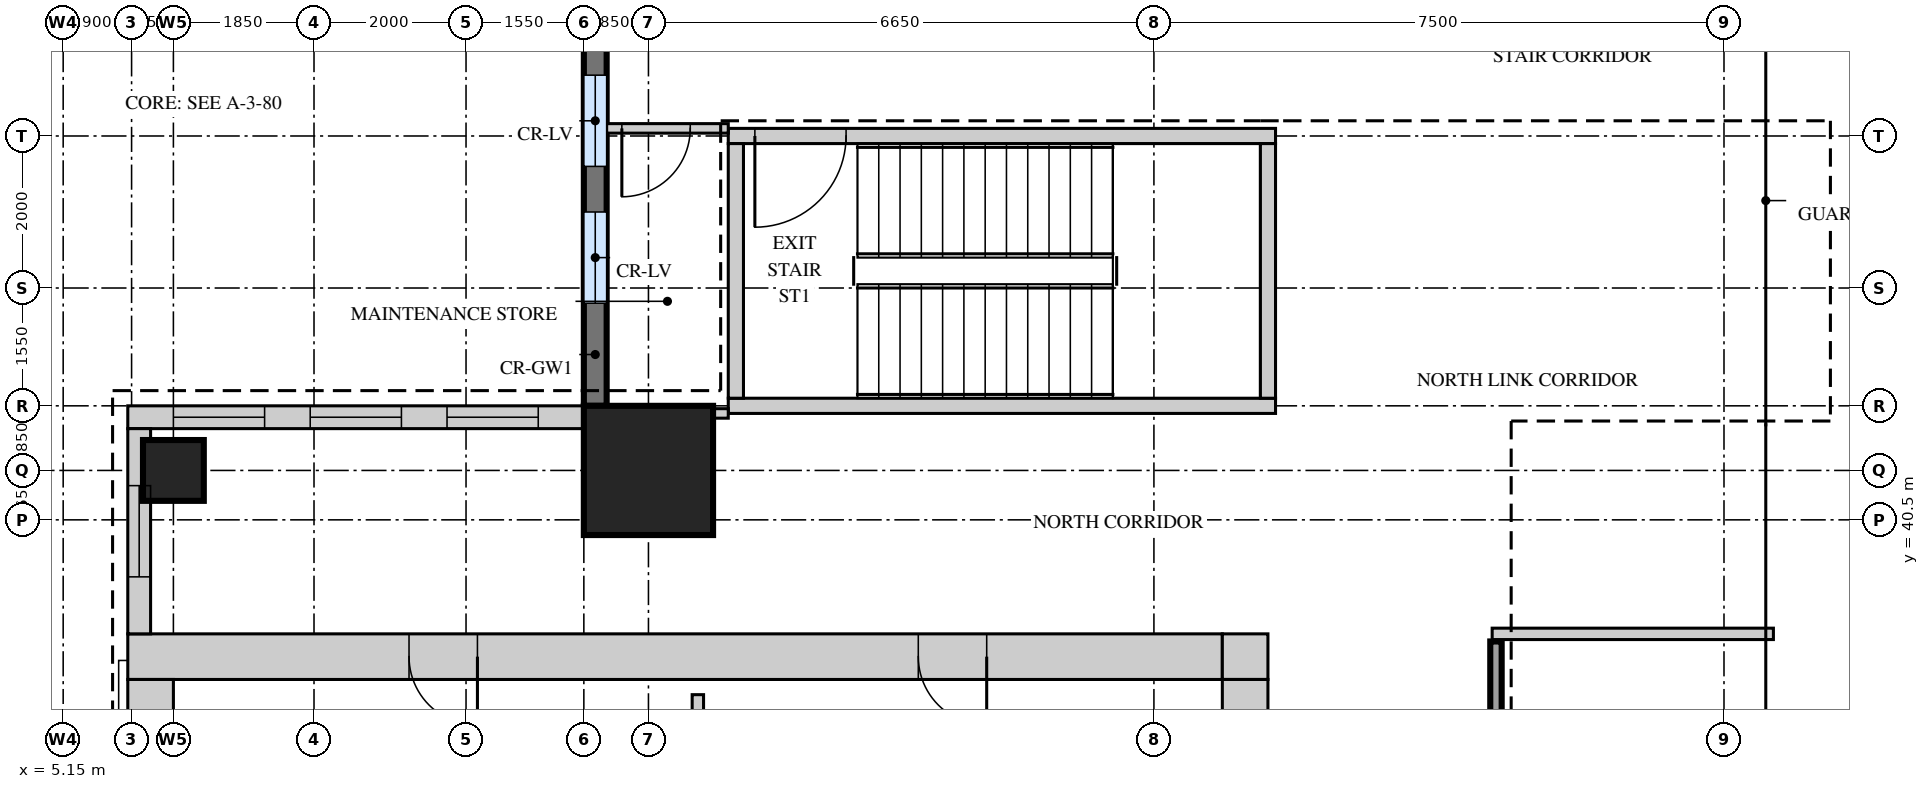
"""IFC4 building model, lengths in metres.
Left out: names, types, materials, properties, quantities, classifications, styles, units other than length and angle.
Written with IfcOpenShell. Run it as: python <this file> out.ifc"""

import sys

from ifc_helpers import new_model, si_unit, direction, frame, frame_2d, origin, origin_2d, place, context, subcontext, project, spatial, rectangle, extrude, source, transform, mapped, element, fill, save


model = new_model("IFC4")
c1 = context("Model", 3, precision=1e-05, world=origin(), true_north=direction((0.0, 1.0)))
c2 = subcontext(c1, "Body", "Model", "MODEL_VIEW")
j1 = project(units=[si_unit("LENGTHUNIT", "METRE"), si_unit("PLANEANGLEUNIT", "RADIAN")], contexts=[c1])
p1 = place(None, origin())
s1 = spatial("IfcSite", under=j1, at=p1, CompositionType="ELEMENT")
p2 = place(p1, origin())
s2 = spatial("IfcBuilding", under=s1, at=p2, CompositionType="ELEMENT")
p3 = place(p2, frame((0.0, 0.0, 348.2)))
s3 = spatial("IfcBuildingStorey", under=s2, at=p3, CompositionType="ELEMENT", Elevation=348.2)
m1 = source(origin(), c2, "Body", "SweptSolid", [
    extrude(rectangle(XDim=14.4, YDim=0.6, at=frame_2d((7.2, 0.0))), origin(), (0.0, 0.0, 1.0), 4.25),
])
p4 = place(p3, frame((6.0, 38.7, 0.0), z_axis=(0.0, 0.0, 1.0), x_axis=(1.0, 0.0, 0.0)))
e1 = element("IfcWall", 1, at=p4, inside=s3, PredefinedType="SHEAR", context=c2, shape_type="MappedRepresentation", body=[
    mapped(m1, transform((0.0, 0.0, 0.0))),
])
m2 = source(origin(), c2, "Body", "SweptSolid", [
    extrude(rectangle(XDim=0.9, YDim=2.1, at=frame_2d((0.45, 1.05))), frame((0.0, 0.31, 0.0), z_axis=(0.0, -1.0, 0.0), x_axis=(1.0, 0.0, 0.0)), (0.0, 0.0, 1.0), 0.62),
])
p5 = place(p4, frame((3.7, 0.0, 0.0)))
e2 = element("IfcOpeningElement", 2, at=p5, cuts=e1, PredefinedType="OPENING", context=c2, shape_type="MappedRepresentation", body=[
    mapped(m2, transform((0.0, 0.0, 0.0))),
])
p6 = place(p4, frame((10.4, 0.0, 0.0)))
e3 = element("IfcOpeningElement", 3, at=p6, cuts=e1, PredefinedType="OPENING", context=c2, shape_type="MappedRepresentation", body=[
    mapped(m2, transform((0.0, 0.0, 0.0))),
])
m3 = source(origin(), c2, "Body", "SweptSolid", [
    extrude(rectangle(XDim=0.6, YDim=0.6, at=frame_2d((0.3, 0.0))), origin(), (0.0, 0.0, 1.0), 4.25),
])
p7 = place(p3, frame((20.4, 38.7, 0.0), z_axis=(0.0, 0.0, 1.0), x_axis=(1.0, 0.0, 0.0)))
e4 = element("IfcWall", 4, at=p7, inside=s3, PredefinedType="SHEAR", context=c2, shape_type="MappedRepresentation", body=[
    mapped(m3, transform((0.0, 0.0, 0.0))),
])
m4 = source(origin(), c2, "Body", "SweptSolid", [
    extrude(rectangle(XDim=22.8, YDim=0.6, at=frame_2d((11.4, 0.0))), origin(), (0.0, 0.0, 1.0), 4.25),
])
p8 = place(p3, frame((20.7, 15.6, 0.0), z_axis=(0.0, 0.0, 1.0), x_axis=(0.0, 1.0, 0.0)))
e5 = element("IfcWall", 5, at=p8, inside=s3, PredefinedType="SHEAR", context=c2, shape_type="MappedRepresentation", body=[
    mapped(m4, transform((0.0, 0.0, 0.0))),
])
p9 = place(p8, frame((8.2, 0.0, 0.0)))
e6 = element("IfcOpeningElement", 6, at=p9, cuts=e5, PredefinedType="OPENING", context=c2, shape_type="MappedRepresentation", body=[
    mapped(m2, transform((0.0, 0.0, 0.0))),
])
p10 = place(p8, frame((11.35, 0.0, 0.0)))
e7 = element("IfcOpeningElement", 7, at=p10, cuts=e5, PredefinedType="OPENING", context=c2, shape_type="MappedRepresentation", body=[
    mapped(m2, transform((0.0, 0.0, 0.0))),
])
p11 = place(p8, frame((14.65, 0.0, 0.0)))
e8 = element("IfcOpeningElement", 8, at=p11, cuts=e5, PredefinedType="OPENING", context=c2, shape_type="MappedRepresentation", body=[
    mapped(m2, transform((0.0, 0.0, 0.0))),
])
p12 = place(p8, frame((1.55, 0.0, 0.0)))
e9 = element("IfcOpeningElement", 9, at=p12, cuts=e5, PredefinedType="OPENING", context=c2, shape_type="MappedRepresentation", body=[
    mapped(m2, transform((0.0, 0.0, 0.0))),
])
p13 = place(p8, frame((5.1, 0.0, 0.0)))
e10 = element("IfcOpeningElement", 10, at=p13, cuts=e5, PredefinedType="OPENING", context=c2, shape_type="MappedRepresentation", body=[
    mapped(m2, transform((0.0, 0.0, 0.0))),
])
p14 = place(p3, frame((6.3, 15.6, 0.0), z_axis=(0.0, 0.0, 1.0), x_axis=(0.0, 1.0, 0.0)))
e11 = element("IfcWall", 11, at=p14, inside=s3, PredefinedType="SHEAR", context=c2, shape_type="MappedRepresentation", body=[
    mapped(m4, transform((0.0, 0.0, 0.0))),
])
m5 = source(origin(), c2, "Body", "SweptSolid", [
    extrude(rectangle(XDim=7.2, YDim=0.2, at=frame_2d((3.6, 0.0))), origin(), (0.0, 0.0, 1.0), 4.25),
])
p15 = place(p3, frame((13.9, 45.55, 0.0), z_axis=(0.0, 0.0, 1.0), x_axis=(1.0, 0.0, 0.0)))
e12 = element("IfcWall", 12, at=p15, inside=s3, PredefinedType="SHEAR", context=c2, shape_type="MappedRepresentation", body=[
    mapped(m5, transform((0.0, 0.0, 0.0))),
])
m6 = source(origin(), c2, "Body", "SweptSolid", [
    extrude(rectangle(XDim=1.2, YDim=2.1, at=frame_2d((0.6, 1.05))), frame((0.0, 0.11, 0.0), z_axis=(0.0, -1.0, 0.0), x_axis=(1.0, 0.0, 0.0)), (0.0, 0.0, 1.0), 0.22),
])
p16 = place(p15, frame((0.35, 0.0, 0.0)))
e13 = element("IfcOpeningElement", 13, at=p16, cuts=e12, PredefinedType="OPENING", context=c2, shape_type="MappedRepresentation", body=[
    mapped(m6, transform((0.0, 0.0, 0.0))),
])
p17 = place(p3, frame((13.9, 42.0, 0.0), z_axis=(0.0, 0.0, 1.0), x_axis=(1.0, 0.0, 0.0)))
e14 = element("IfcWall", 14, at=p17, inside=s3, PredefinedType="SHEAR", context=c2, shape_type="MappedRepresentation", body=[
    mapped(m5, transform((0.0, 0.0, 0.0))),
])
m7 = source(origin(), c2, "Body", "SweptSolid", [
    extrude(rectangle(XDim=3.35, YDim=0.2, at=frame_2d((1.675, 0.0))), origin(), (0.0, 0.0, 1.0), 4.25),
])
for number, where, z_axis, x_axis in (
    (15, (21.0, 42.1, 0.0), (0.0, 0.0, 1.0), (0.0, 1.0, 0.0)),
    (16, (14.0, 42.1, 0.0), (0.0, 0.0, 1.0), (0.0, 1.0, 0.0)),
):
    element("IfcWall", number, at=place(p3, frame(where, z_axis=z_axis, x_axis=x_axis)), inside=s3, PredefinedType="SHEAR", context=c2, shape_type="MappedRepresentation", body=[
        mapped(m7, transform((0.0, 0.0, 0.0))),
    ])
m8 = source(origin(), c2, "Body", "SweptSolid", [
    extrude(rectangle(XDim=1.7, YDim=1.7, at=origin_2d()), origin(), (0.0, 0.0, 1.0), 4.5),
])
p18 = place(p3, frame((12.85, 41.15, 0.0), z_axis=(0.0, 0.0, 1.0), x_axis=(1.0, 0.0, 0.0)))
e17 = element("IfcColumn", 17, at=p18, inside=s3, PredefinedType="COLUMN", context=c2, shape_type="MappedRepresentation", body=[
    mapped(m8, transform((0.0, 0.0, 0.0))),
])
m9 = source(origin(), c2, "Body", "SweptSolid", [
    extrude(rectangle(XDim=0.8, YDim=0.8, at=origin_2d()), origin(), (0.0, 0.0, 1.0), 4.5),
])
p19 = place(p3, frame((6.6, 41.15, 0.0), z_axis=(0.0, 0.0, 1.0), x_axis=(1.0, 0.0, 0.0)))
e18 = element("IfcColumn", 18, at=p19, inside=s3, PredefinedType="COLUMN", context=c2, shape_type="MappedRepresentation", body=[
    mapped(m9, transform((0.0, 0.0, 0.0))),
])
m10 = source(origin(), c2, "Body", "SweptSolid", [
    extrude(rectangle(XDim=5.7, YDim=0.3, at=frame_2d((2.85, 0.0))), origin(), (0.0, 0.0, 1.0), 4.5),
])
p20 = place(p3, frame((12.15, 47.7, 0.0), z_axis=(0.0, 0.0, 1.0), x_axis=(0.0, -1.0, 0.0)))
e19 = element("IfcWall", 19, at=p20, inside=s3, PredefinedType="SOLIDWALL", context=c2, shape_type="MappedRepresentation", body=[
    mapped(m10, transform((0.0, 0.0, 0.0))),
])
m11 = source(origin(), c2, "Body", "SweptSolid", [
    extrude(rectangle(XDim=1.2, YDim=2.4, at=frame_2d((0.6, 1.2))), frame((0.0, 0.16, 0.0), z_axis=(0.0, -1.0, 0.0), x_axis=(1.0, 0.0, 0.0)), (0.0, 0.0, 1.0), 0.32),
])
p21 = place(p20, frame((1.35, 0.0, 0.9)))
e20 = element("IfcOpeningElement", 20, at=p21, cuts=e19, PredefinedType="OPENING", context=c2, shape_type="MappedRepresentation", body=[
    mapped(m11, transform((0.0, 0.0, 0.0))),
])
p22 = place(p20, frame((3.15, 0.0, 0.9)))
e21 = element("IfcOpeningElement", 21, at=p22, cuts=e19, PredefinedType="OPENING", context=c2, shape_type="MappedRepresentation", body=[
    mapped(m11, transform((0.0, 0.0, 0.0))),
])
m12 = source(origin(), c2, "Body", "SweptSolid", [
    extrude(rectangle(XDim=6.0, YDim=0.3, at=frame_2d((3.0, 0.0))), origin(), (0.0, 0.0, 1.0), 4.5),
])
p23 = place(p3, frame((12.0, 41.85, 0.0), z_axis=(0.0, 0.0, 1.0), x_axis=(-1.0, 0.0, 0.0)))
e22 = element("IfcWall", 22, at=p23, inside=s3, PredefinedType="SOLIDWALL", context=c2, shape_type="MappedRepresentation", body=[
    mapped(m12, transform((0.0, 0.0, 0.0))),
])
p24 = place(p23, frame((0.6, 0.0, 0.9)))
e23 = element("IfcOpeningElement", 23, at=p24, cuts=e22, PredefinedType="OPENING", context=c2, shape_type="MappedRepresentation", body=[
    mapped(m11, transform((0.0, 0.0, 0.0))),
])
p25 = place(p23, frame((2.4, 0.0, 0.9)))
e24 = element("IfcOpeningElement", 24, at=p25, cuts=e22, PredefinedType="OPENING", context=c2, shape_type="MappedRepresentation", body=[
    mapped(m11, transform((0.0, 0.0, 0.0))),
])
p26 = place(p23, frame((4.2, 0.0, 0.9)))
e25 = element("IfcOpeningElement", 25, at=p26, cuts=e22, PredefinedType="OPENING", context=c2, shape_type="MappedRepresentation", body=[
    mapped(m11, transform((0.0, 0.0, 0.0))),
])
m13 = source(origin(), c2, "Body", "SweptSolid", [
    extrude(rectangle(XDim=2.7, YDim=0.3, at=frame_2d((1.35, 0.0))), origin(), (0.0, 0.0, 1.0), 4.5),
])
p27 = place(p3, frame((6.15, 41.7, 0.0), z_axis=(0.0, 0.0, 1.0), x_axis=(0.0, -1.0, 0.0)))
e26 = element("IfcWall", 26, at=p27, inside=s3, PredefinedType="SOLIDWALL", context=c2, shape_type="MappedRepresentation", body=[
    mapped(m13, transform((0.0, 0.0, 0.0))),
])
p28 = place(p27, frame((0.75, 0.0, 0.9)))
e27 = element("IfcOpeningElement", 27, at=p28, cuts=e26, PredefinedType="OPENING", context=c2, shape_type="MappedRepresentation", body=[
    mapped(m11, transform((0.0, 0.0, 0.0))),
])
m14 = source(origin(), c2, "Body", "SweptSolid", [
    extrude(rectangle(XDim=32.6, YDim=0.15, at=frame_2d((16.3, 0.0))), origin(), (0.0, 0.0, 1.0), 4.3),
])
p29 = place(p3, frame((24.0, 6.3, 0.0), z_axis=(0.0, 0.0, 1.0), x_axis=(0.0, 1.0, 0.0)))
e28 = element("IfcWall", 28, at=p29, inside=s3, PredefinedType="PARTITIONING", context=c2, shape_type="MappedRepresentation", body=[
    mapped(m14, transform((0.0, 0.0, 0.0))),
])
m15 = source(origin(), c2, "Body", "SweptSolid", [
    extrude(rectangle(XDim=0.9, YDim=2.1, at=frame_2d((0.45, 1.05))), frame((0.0, 0.085, 0.0), z_axis=(0.0, -1.0, 0.0), x_axis=(1.0, 0.0, 0.0)), (0.0, 0.0, 1.0), 0.17),
])
p30 = place(p29, frame((13.6, 0.0, 0.0)))
e29 = element("IfcOpeningElement", 29, at=p30, cuts=e28, PredefinedType="OPENING", context=c2, shape_type="MappedRepresentation", body=[
    mapped(m15, transform((0.0, 0.0, 0.0))),
])
p31 = place(p29, frame((25.9, 0.0, 0.0)))
e30 = element("IfcOpeningElement", 30, at=p31, cuts=e28, PredefinedType="OPENING", context=c2, shape_type="MappedRepresentation", body=[
    mapped(m15, transform((0.0, 0.0, 0.0))),
])
m16 = source(origin(), c2, "Body", "SweptSolid", [
    extrude(rectangle(XDim=5.9, YDim=0.15, at=frame_2d((2.95, 0.0))), origin(), (0.0, 0.0, 1.0), 4.3),
])
p32 = place(p3, frame((13.5, 32.3, 0.0), z_axis=(0.0, 0.0, 1.0), x_axis=(0.0, 1.0, 0.0)))
e31 = element("IfcWall", 31, at=p32, inside=s3, PredefinedType="PARTITIONING", context=c2, shape_type="MappedRepresentation", body=[
    mapped(m16, transform((0.0, 0.0, 0.0))),
])
m17 = source(origin(), c2, "Body", "SweptSolid", [
    extrude(rectangle(XDim=3.7, YDim=0.15, at=frame_2d((1.85, 0.0))), origin(), (0.0, 0.0, 1.0), 4.3),
])
p33 = place(p3, frame((23.95, 39.0, 0.0), z_axis=(0.0, 0.0, 1.0), x_axis=(1.0, 0.0, 0.0)))
e32 = element("IfcWall", 32, at=p33, inside=s3, PredefinedType="PARTITIONING", context=c2, shape_type="MappedRepresentation", body=[
    mapped(m17, transform((0.0, 0.0, 0.0))),
])
m18 = source(origin(), c2, "Body", "SweptSolid", [
    extrude(rectangle(XDim=1.9, YDim=0.125, at=frame_2d((0.95, 0.0))), origin(), (0.0, 0.0, 1.0), 4.3),
])
p34 = place(p3, frame((12.0, 41.9, 0.0), z_axis=(0.0, 0.0, 1.0), x_axis=(1.0, 0.0, 0.0)))
e33 = element("IfcWall", 33, at=p34, inside=s3, PredefinedType="PARTITIONING", context=c2, shape_type="MappedRepresentation", body=[
    mapped(m18, transform((0.0, 0.0, 0.0))),
])
m19 = source(origin(), c2, "Body", "SweptSolid", [
    extrude(rectangle(XDim=1.6, YDim=0.125, at=frame_2d((0.8, 0.0))), origin(), (0.0, 0.0, 1.0), 4.3),
])
p35 = place(p3, frame((12.3, 45.65, 0.0), z_axis=(0.0, 0.0, 1.0), x_axis=(1.0, 0.0, 0.0)))
e34 = element("IfcWall", 34, at=p35, inside=s3, PredefinedType="PARTITIONING", context=c2, shape_type="MappedRepresentation", body=[
    mapped(m19, transform((0.0, 0.0, 0.0))),
])
m20 = source(origin(), c2, "Body", "SweptSolid", [
    extrude(rectangle(XDim=0.9, YDim=2.1, at=frame_2d((0.45, 1.05))), frame((0.0, 0.073, 0.0), z_axis=(0.0, -1.0, 0.0), x_axis=(1.0, 0.0, 0.0)), (0.0, 0.0, 1.0), 0.145),
])
p36 = place(p35, frame((0.2, 0.0, 0.0)))
e35 = element("IfcOpeningElement", 35, at=p36, cuts=e34, PredefinedType="OPENING", context=c2, shape_type="MappedRepresentation", body=[
    mapped(m20, transform((0.0, 0.0, 0.0))),
])
m21 = source(origin(), c2, "Body", "SweptSolid", [
    extrude(rectangle(XDim=1.2, YDim=2.4, at=frame_2d((0.6, 1.2))), frame((0.0, 0.03, 0.0), z_axis=(0.0, -1.0, 0.0), x_axis=(1.0, 0.0, 0.0)), (0.0, 0.0, 1.0), 0.06),
])
p37 = place(p21, origin())
e36 = element("IfcWindow", 36, at=p37, inside=s3, PartitioningType="SINGLE_PANEL", PredefinedType="WINDOW", context=c2, shape_type="MappedRepresentation", body=[
    mapped(m21, transform((0.0, 0.0, 0.0))),
])
fill(e20, e36)
p38 = place(p22, origin())
e37 = element("IfcWindow", 37, at=p38, inside=s3, PartitioningType="SINGLE_PANEL", PredefinedType="WINDOW", context=c2, shape_type="MappedRepresentation", body=[
    mapped(m21, transform((0.0, 0.0, 0.0))),
])
fill(e21, e37)
p39 = place(p24, origin())
e38 = element("IfcWindow", 38, at=p39, inside=s3, PartitioningType="SINGLE_PANEL", PredefinedType="WINDOW", context=c2, shape_type="MappedRepresentation", body=[
    mapped(m21, transform((0.0, 0.0, 0.0))),
])
fill(e23, e38)
p40 = place(p25, origin())
e39 = element("IfcWindow", 39, at=p40, inside=s3, PartitioningType="SINGLE_PANEL", PredefinedType="WINDOW", context=c2, shape_type="MappedRepresentation", body=[
    mapped(m21, transform((0.0, 0.0, 0.0))),
])
fill(e24, e39)
p41 = place(p26, origin())
e40 = element("IfcWindow", 40, at=p41, inside=s3, PartitioningType="SINGLE_PANEL", PredefinedType="WINDOW", context=c2, shape_type="MappedRepresentation", body=[
    mapped(m21, transform((0.0, 0.0, 0.0))),
])
fill(e25, e40)
p42 = place(p28, origin())
e41 = element("IfcWindow", 41, at=p42, inside=s3, PartitioningType="SINGLE_PANEL", PredefinedType="WINDOW", context=c2, shape_type="MappedRepresentation", body=[
    mapped(m21, transform((0.0, 0.0, 0.0))),
])
fill(e27, e41)
m22 = source(origin(), c2, "Body", "SweptSolid", [
    extrude(rectangle(XDim=0.9, YDim=2.1, at=frame_2d((0.45, 1.05))), frame((0.0, 0.025, 0.0), z_axis=(0.0, -1.0, 0.0), x_axis=(1.0, 0.0, 0.0)), (0.0, 0.0, 1.0), 0.05),
])
p43 = place(p36, origin())
e42 = element("IfcDoor", 42, at=p43, inside=s3, OperationType="SINGLE_SWING_LEFT", PredefinedType="DOOR", context=c2, shape_type="MappedRepresentation", body=[
    mapped(m22, transform((0.0, 0.0, 0.0))),
])
fill(e35, e42)
m23 = source(origin(), c2, "Body", "SweptSolid", [
    extrude(rectangle(XDim=0.9, YDim=2.1, at=frame_2d((0.45, 1.05))), frame((0.0, 0.25, 0.0), z_axis=(0.0, -1.0, 0.0), x_axis=(1.0, 0.0, 0.0)), (0.0, 0.0, 1.0), 0.5),
])
p44 = place(p5, origin())
e43 = element("IfcDoor", 43, at=p44, inside=s3, OperationType="SINGLE_SWING_RIGHT", PredefinedType="DOOR", context=c2, shape_type="MappedRepresentation", body=[
    mapped(m23, transform((0.0, 0.0, 0.0))),
])
fill(e2, e43)
p45 = place(p6, origin())
e44 = element("IfcDoor", 44, at=p45, inside=s3, OperationType="SINGLE_SWING_RIGHT", PredefinedType="DOOR", context=c2, shape_type="MappedRepresentation", body=[
    mapped(m23, transform((0.0, 0.0, 0.0))),
])
fill(e3, e44)
m24 = source(origin(), c2, "Body", "SweptSolid", [
    extrude(rectangle(XDim=1.2, YDim=2.1, at=frame_2d((0.6, 1.05))), frame((0.0, 0.025, 0.0), z_axis=(0.0, -1.0, 0.0), x_axis=(1.0, 0.0, 0.0)), (0.0, 0.0, 1.0), 0.05),
])
p46 = place(p16, origin())
e45 = element("IfcDoor", 45, at=p46, inside=s3, OperationType="SINGLE_SWING_LEFT", PredefinedType="DOOR", context=c2, shape_type="MappedRepresentation", body=[
    mapped(m24, transform((0.0, 0.0, 0.0))),
])
fill(e13, e45)
save(model, sys.argv[1])
